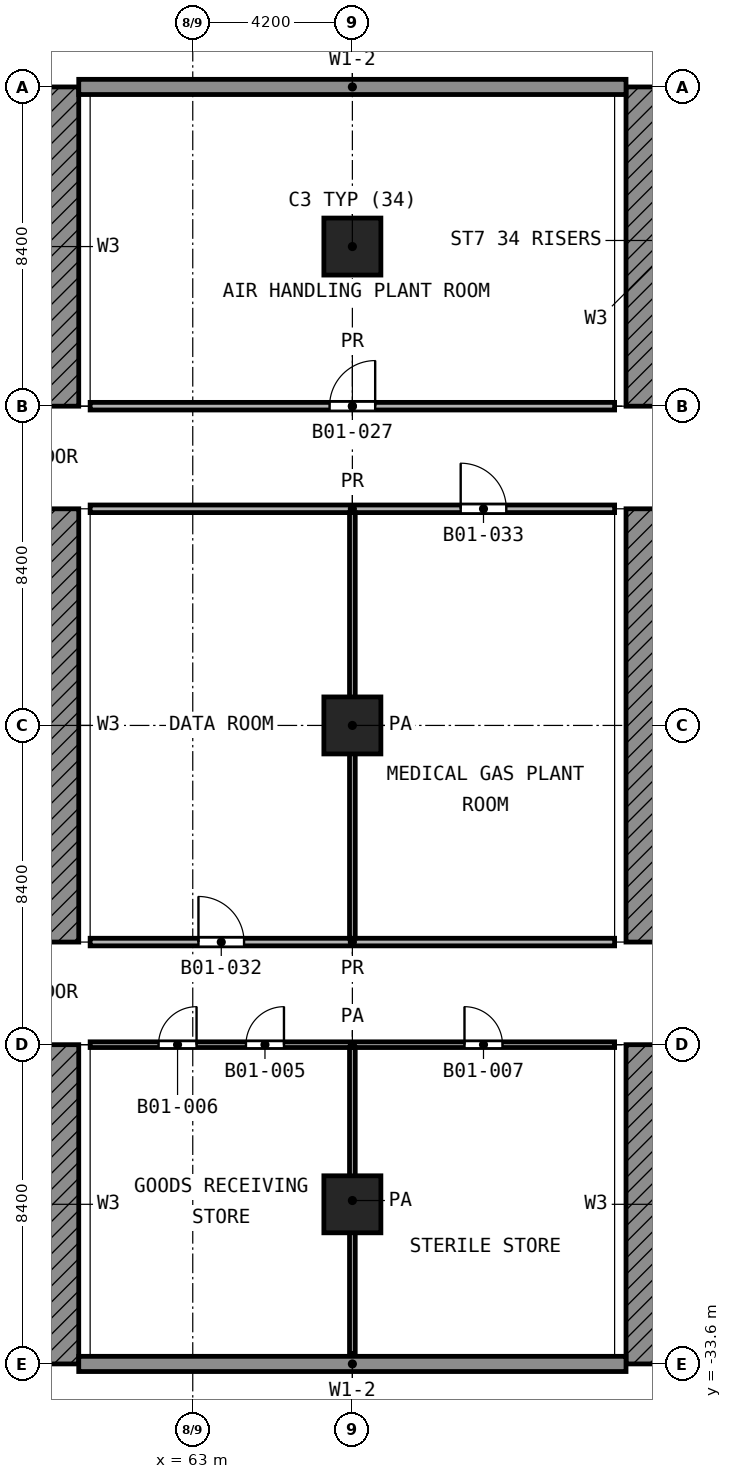
"""IFC4 building model, lengths in metres.
Left out: names, types, materials, properties, quantities, classifications, styles, units other than length and angle.
Written with IfcOpenShell. Run it as: python <this file> out.ifc"""

import sys

from ifc_helpers import new_model, si_unit, direction, frame, frame_2d, origin, origin_2d, place, context, subcontext, project, spatial, polyline, rectangle, outline, extrude, element, fill, save


model = new_model("IFC4")
c1 = context("Model", 3, precision=1e-05, world=origin(), true_north=direction((0.0, 1.0)))
c2 = subcontext(c1, "Body", "Model", "MODEL_VIEW")
j1 = project(units=[si_unit("LENGTHUNIT", "METRE"), si_unit("PLANEANGLEUNIT", "RADIAN")], contexts=[c1])
p1 = place(None, origin())
s1 = spatial("IfcSite", under=j1, at=p1, CompositionType="ELEMENT")
p2 = place(p1, origin())
s2 = spatial("IfcBuilding", under=s1, at=p2, CompositionType="ELEMENT")
p3 = place(p2, frame((0.0, 0.0, -6.0)))
s3 = spatial("IfcBuildingStorey", under=s2, at=p3, CompositionType="ELEMENT", Elevation=-6.0)
p4 = place(p3, origin())
e1 = element("IfcWall", 1, at=p4, inside=s3, PredefinedType="SOLIDWALL", context=c2, shape_type="SweptSolid", body=[
    extrude(outline(polyline([(74.4, -0.2), (60.0, -0.2), (60.0, 0.2), (74.4, 0.2), (74.4, -0.2)])), origin(), (0.0, 0.0, 1.0), 4.95),
])
e2 = element("IfcWall", 2, at=p4, inside=s3, PredefinedType="SOLIDWALL", context=c2, shape_type="SweptSolid", body=[
    extrude(outline(polyline([(60.0, -33.4), (74.4, -33.4), (74.4, -33.8), (60.0, -33.8), (60.0, -33.4)])), origin(), (0.0, 0.0, 1.0), 4.95),
])
for number, where, z_axis, x_axis in (
    (3, (67.2, -4.2, 0.0), (0.0, 0.0, 1.0), (1.0, 0.0, 0.0)),
    (4, (67.2, -16.8, 0.0), (0.0, 0.0, 1.0), (1.0, 0.0, 0.0)),
    (5, (67.2, -29.4, 0.0), (0.0, 0.0, 1.0), (1.0, 0.0, 0.0)),
):
    element("IfcColumn", number, at=place(p3, frame(where, z_axis=z_axis, x_axis=x_axis)), inside=s3, PredefinedType="COLUMN", context=c2, shape_type="SweptSolid", body=[
        extrude(rectangle(XDim=1.5, YDim=1.5, at=origin_2d()), origin(), (0.0, 0.0, 1.0), 4.95),
    ])
p5 = place(p3, frame((0.0, 0.0, 6.0), z_axis=(0.0, -1.0, 0.0), x_axis=(1.0, 0.0, 0.0)))
e6 = element("IfcWall", 6, at=p5, inside=s3, PredefinedType="SHEAR", context=c2, shape_type="SweptSolid", body=[
    extrude(outline(polyline([(60.0, 0.0), (60.0, -6.0), (57.6, -6.0), (57.6, 0.0), (60.0, 0.0)])), origin(), (0.0, 0.0, 1.0), 8.4),
])
p6 = place(p3, frame((0.0, -11.1, 6.0), z_axis=(0.0, -1.0, 0.0), x_axis=(1.0, 0.0, 0.0)))
e7 = element("IfcWall", 7, at=p6, inside=s3, PredefinedType="SHEAR", context=c2, shape_type="SweptSolid", body=[
    extrude(outline(polyline([(60.0, 0.0), (60.0, -6.0), (57.6, -6.0), (57.6, 0.0), (60.0, 0.0)])), origin(), (0.0, 0.0, 1.0), 11.4),
])
p7 = place(p3, frame((0.0, -25.2, 6.0), z_axis=(0.0, -1.0, 0.0), x_axis=(1.0, 0.0, 0.0)))
e8 = element("IfcWall", 8, at=p7, inside=s3, PredefinedType="SHEAR", context=c2, shape_type="SweptSolid", body=[
    extrude(outline(polyline([(60.0, 0.0), (60.0, -6.0), (57.6, -6.0), (57.6, 0.0), (60.0, 0.0)])), origin(), (0.0, 0.0, 1.0), 8.4),
])
e9 = element("IfcWall", 9, at=p5, inside=s3, PredefinedType="SHEAR", context=c2, shape_type="SweptSolid", body=[
    extrude(outline(polyline([(74.4, -6.0), (74.4, 0.0), (76.8, 0.0), (76.8, -6.0), (74.4, -6.0)])), origin(), (0.0, 0.0, 1.0), 8.4),
])
e10 = element("IfcWall", 10, at=p6, inside=s3, PredefinedType="SHEAR", context=c2, shape_type="SweptSolid", body=[
    extrude(outline(polyline([(74.4, -6.0), (74.4, 0.0), (76.8, 0.0), (76.8, -6.0), (74.4, -6.0)])), origin(), (0.0, 0.0, 1.0), 11.4),
])
e11 = element("IfcWall", 11, at=p7, inside=s3, PredefinedType="SHEAR", context=c2, shape_type="SweptSolid", body=[
    extrude(outline(polyline([(74.4, -6.0), (74.4, 0.0), (76.8, 0.0), (76.8, -6.0), (74.4, -6.0)])), origin(), (0.0, 0.0, 1.0), 8.4),
])
p8 = place(p3, frame((60.3, -25.2, 0.0), z_axis=(0.0, 0.0, 1.0), x_axis=(1.0, 0.0, 0.0)))
e12 = element("IfcWall", 12, at=p8, inside=s3, PredefinedType="PARTITIONING", context=c2, shape_type="SweptSolid", body=[
    extrude(rectangle(XDim=13.8, YDim=0.15, at=frame_2d((6.9, 0.0))), origin(), (0.0, 0.0, 1.0), 5.55),
])
p9 = place(p8, frame((4.1, 0.0, 0.0)))
e13 = element("IfcOpeningElement", 13, at=p9, cuts=e12, PredefinedType="OPENING", context=c2, shape_type="SweptSolid", body=[
    extrude(rectangle(XDim=1.0, YDim=2.1, at=frame_2d((0.5, 1.05))), frame((0.0, 0.085, 0.0), z_axis=(0.0, -1.0, 0.0), x_axis=(1.0, 0.0, 0.0)), (0.0, 0.0, 1.0), 0.17),
])
p10 = place(p8, frame((1.8, 0.0, 0.0)))
e14 = element("IfcOpeningElement", 14, at=p10, cuts=e12, PredefinedType="OPENING", context=c2, shape_type="SweptSolid", body=[
    extrude(rectangle(XDim=1.0, YDim=2.1, at=frame_2d((0.5, 1.05))), frame((0.0, 0.085, 0.0), z_axis=(0.0, -1.0, 0.0), x_axis=(1.0, 0.0, 0.0)), (0.0, 0.0, 1.0), 0.17),
])
p11 = place(p8, frame((9.85, 0.0, 0.0)))
e15 = element("IfcOpeningElement", 15, at=p11, cuts=e12, PredefinedType="OPENING", context=c2, shape_type="SweptSolid", body=[
    extrude(rectangle(XDim=1.0, YDim=2.1, at=frame_2d((0.5, 1.05))), frame((0.0, 0.085, 0.0), z_axis=(0.0, -1.0, 0.0), x_axis=(1.0, 0.0, 0.0)), (0.0, 0.0, 1.0), 0.17),
])
p12 = place(p3, frame((67.2, -33.326, 0.0), z_axis=(0.0, 0.0, 1.0), x_axis=(0.0, 1.0, 0.0)))
e16 = element("IfcWall", 16, at=p12, inside=s3, PredefinedType="PARTITIONING", context=c2, shape_type="SweptSolid", body=[
    extrude(rectangle(XDim=8.051, YDim=0.15, at=frame_2d((4.025, 0.0))), origin(), (0.0, 0.0, 1.0), 5.55),
])
p13 = place(p3, frame((67.2, -22.4, 0.0), z_axis=(0.0, 0.0, 1.0), x_axis=(0.0, 1.0, 0.0)))
e17 = element("IfcWall", 17, at=p13, inside=s3, PredefinedType="PARTITIONING", context=c2, shape_type="SweptSolid", body=[
    extrude(rectangle(XDim=11.2, YDim=0.15, at=frame_2d((5.6, 0.0))), origin(), (0.0, 0.0, 1.0), 5.55),
])
p14 = place(p3, frame((60.3, -22.5, 0.0), z_axis=(0.0, 0.0, 1.0), x_axis=(1.0, 0.0, 0.0)))
e18 = element("IfcWall", 18, at=p14, inside=s3, PredefinedType="PARTITIONING", context=c2, shape_type="SweptSolid", body=[
    extrude(rectangle(XDim=13.8, YDim=0.2, at=frame_2d((6.9, 0.0))), origin(), (0.0, 0.0, 1.0), 5.55),
])
p15 = place(p14, frame((2.85, 0.0, 0.0)))
e19 = element("IfcOpeningElement", 19, at=p15, cuts=e18, PredefinedType="OPENING", context=c2, shape_type="SweptSolid", body=[
    extrude(rectangle(XDim=1.2, YDim=2.1, at=frame_2d((0.6, 1.05))), frame((0.0, 0.11, 0.0), z_axis=(0.0, -1.0, 0.0), x_axis=(1.0, 0.0, 0.0)), (0.0, 0.0, 1.0), 0.22),
])
p16 = place(p3, frame((60.3, -11.1, 0.0), z_axis=(0.0, 0.0, 1.0), x_axis=(1.0, 0.0, 0.0)))
e20 = element("IfcWall", 20, at=p16, inside=s3, PredefinedType="PARTITIONING", context=c2, shape_type="SweptSolid", body=[
    extrude(rectangle(XDim=13.8, YDim=0.2, at=frame_2d((6.9, 0.0))), origin(), (0.0, 0.0, 1.0), 5.55),
])
p17 = place(p16, frame((9.75, 0.0, 0.0)))
e21 = element("IfcOpeningElement", 21, at=p17, cuts=e20, PredefinedType="OPENING", context=c2, shape_type="SweptSolid", body=[
    extrude(rectangle(XDim=1.2, YDim=2.1, at=frame_2d((0.6, 1.05))), frame((0.0, 0.11, 0.0), z_axis=(0.0, -1.0, 0.0), x_axis=(1.0, 0.0, 0.0)), (0.0, 0.0, 1.0), 0.22),
])
p18 = place(p3, frame((60.3, -8.4, 0.0), z_axis=(0.0, 0.0, 1.0), x_axis=(1.0, 0.0, 0.0)))
e22 = element("IfcWall", 22, at=p18, inside=s3, PredefinedType="PARTITIONING", context=c2, shape_type="SweptSolid", body=[
    extrude(rectangle(XDim=13.8, YDim=0.2, at=frame_2d((6.9, 0.0))), origin(), (0.0, 0.0, 1.0), 5.55),
])
p19 = place(p18, frame((6.3, 0.0, 0.0)))
e23 = element("IfcOpeningElement", 23, at=p19, cuts=e22, PredefinedType="OPENING", context=c2, shape_type="SweptSolid", body=[
    extrude(rectangle(XDim=1.2, YDim=2.1, at=frame_2d((0.6, 1.05))), frame((0.0, 0.11, 0.0), z_axis=(0.0, -1.0, 0.0), x_axis=(1.0, 0.0, 0.0)), (0.0, 0.0, 1.0), 0.22),
])
p20 = place(p19, origin())
e24 = element("IfcDoor", 24, at=p20, inside=s3, OperationType="SINGLE_SWING_RIGHT", PredefinedType="DOOR", context=c2, shape_type="SweptSolid", body=[
    extrude(rectangle(XDim=1.2, YDim=2.1, at=frame_2d((0.6, 1.05))), frame((0.0, 0.025, 0.0), z_axis=(0.0, -1.0, 0.0), x_axis=(1.0, 0.0, 0.0)), (0.0, 0.0, 1.0), 0.05),
])
fill(e23, e24)
p21 = place(p15, origin())
e25 = element("IfcDoor", 25, at=p21, inside=s3, OperationType="SINGLE_SWING_LEFT", PredefinedType="DOOR", context=c2, shape_type="SweptSolid", body=[
    extrude(rectangle(XDim=1.2, YDim=2.1, at=frame_2d((0.6, 1.05))), frame((0.0, 0.025, 0.0), z_axis=(0.0, -1.0, 0.0), x_axis=(1.0, 0.0, 0.0)), (0.0, 0.0, 1.0), 0.05),
])
fill(e19, e25)
p22 = place(p17, origin())
e26 = element("IfcDoor", 26, at=p22, inside=s3, OperationType="SINGLE_SWING_LEFT", PredefinedType="DOOR", context=c2, shape_type="SweptSolid", body=[
    extrude(rectangle(XDim=1.2, YDim=2.1, at=frame_2d((0.6, 1.05))), frame((0.0, 0.025, 0.0), z_axis=(0.0, -1.0, 0.0), x_axis=(1.0, 0.0, 0.0)), (0.0, 0.0, 1.0), 0.05),
])
fill(e21, e26)
p23 = place(p9, origin())
e27 = element("IfcDoor", 27, at=p23, inside=s3, OperationType="SINGLE_SWING_RIGHT", PredefinedType="DOOR", context=c2, shape_type="SweptSolid", body=[
    extrude(rectangle(XDim=1.0, YDim=2.1, at=frame_2d((0.5, 1.05))), frame((0.0, 0.025, 0.0), z_axis=(0.0, -1.0, 0.0), x_axis=(1.0, 0.0, 0.0)), (0.0, 0.0, 1.0), 0.05),
])
fill(e13, e27)
p24 = place(p10, origin())
e28 = element("IfcDoor", 28, at=p24, inside=s3, OperationType="SINGLE_SWING_RIGHT", PredefinedType="DOOR", context=c2, shape_type="SweptSolid", body=[
    extrude(rectangle(XDim=1.0, YDim=2.1, at=frame_2d((0.5, 1.05))), frame((0.0, 0.025, 0.0), z_axis=(0.0, -1.0, 0.0), x_axis=(1.0, 0.0, 0.0)), (0.0, 0.0, 1.0), 0.05),
])
fill(e14, e28)
p25 = place(p11, origin())
e29 = element("IfcDoor", 29, at=p25, inside=s3, OperationType="SINGLE_SWING_LEFT", PredefinedType="DOOR", context=c2, shape_type="SweptSolid", body=[
    extrude(rectangle(XDim=1.0, YDim=2.1, at=frame_2d((0.5, 1.05))), frame((0.0, 0.025, 0.0), z_axis=(0.0, -1.0, 0.0), x_axis=(1.0, 0.0, 0.0)), (0.0, 0.0, 1.0), 0.05),
])
fill(e15, e29)
save(model, sys.argv[1])
